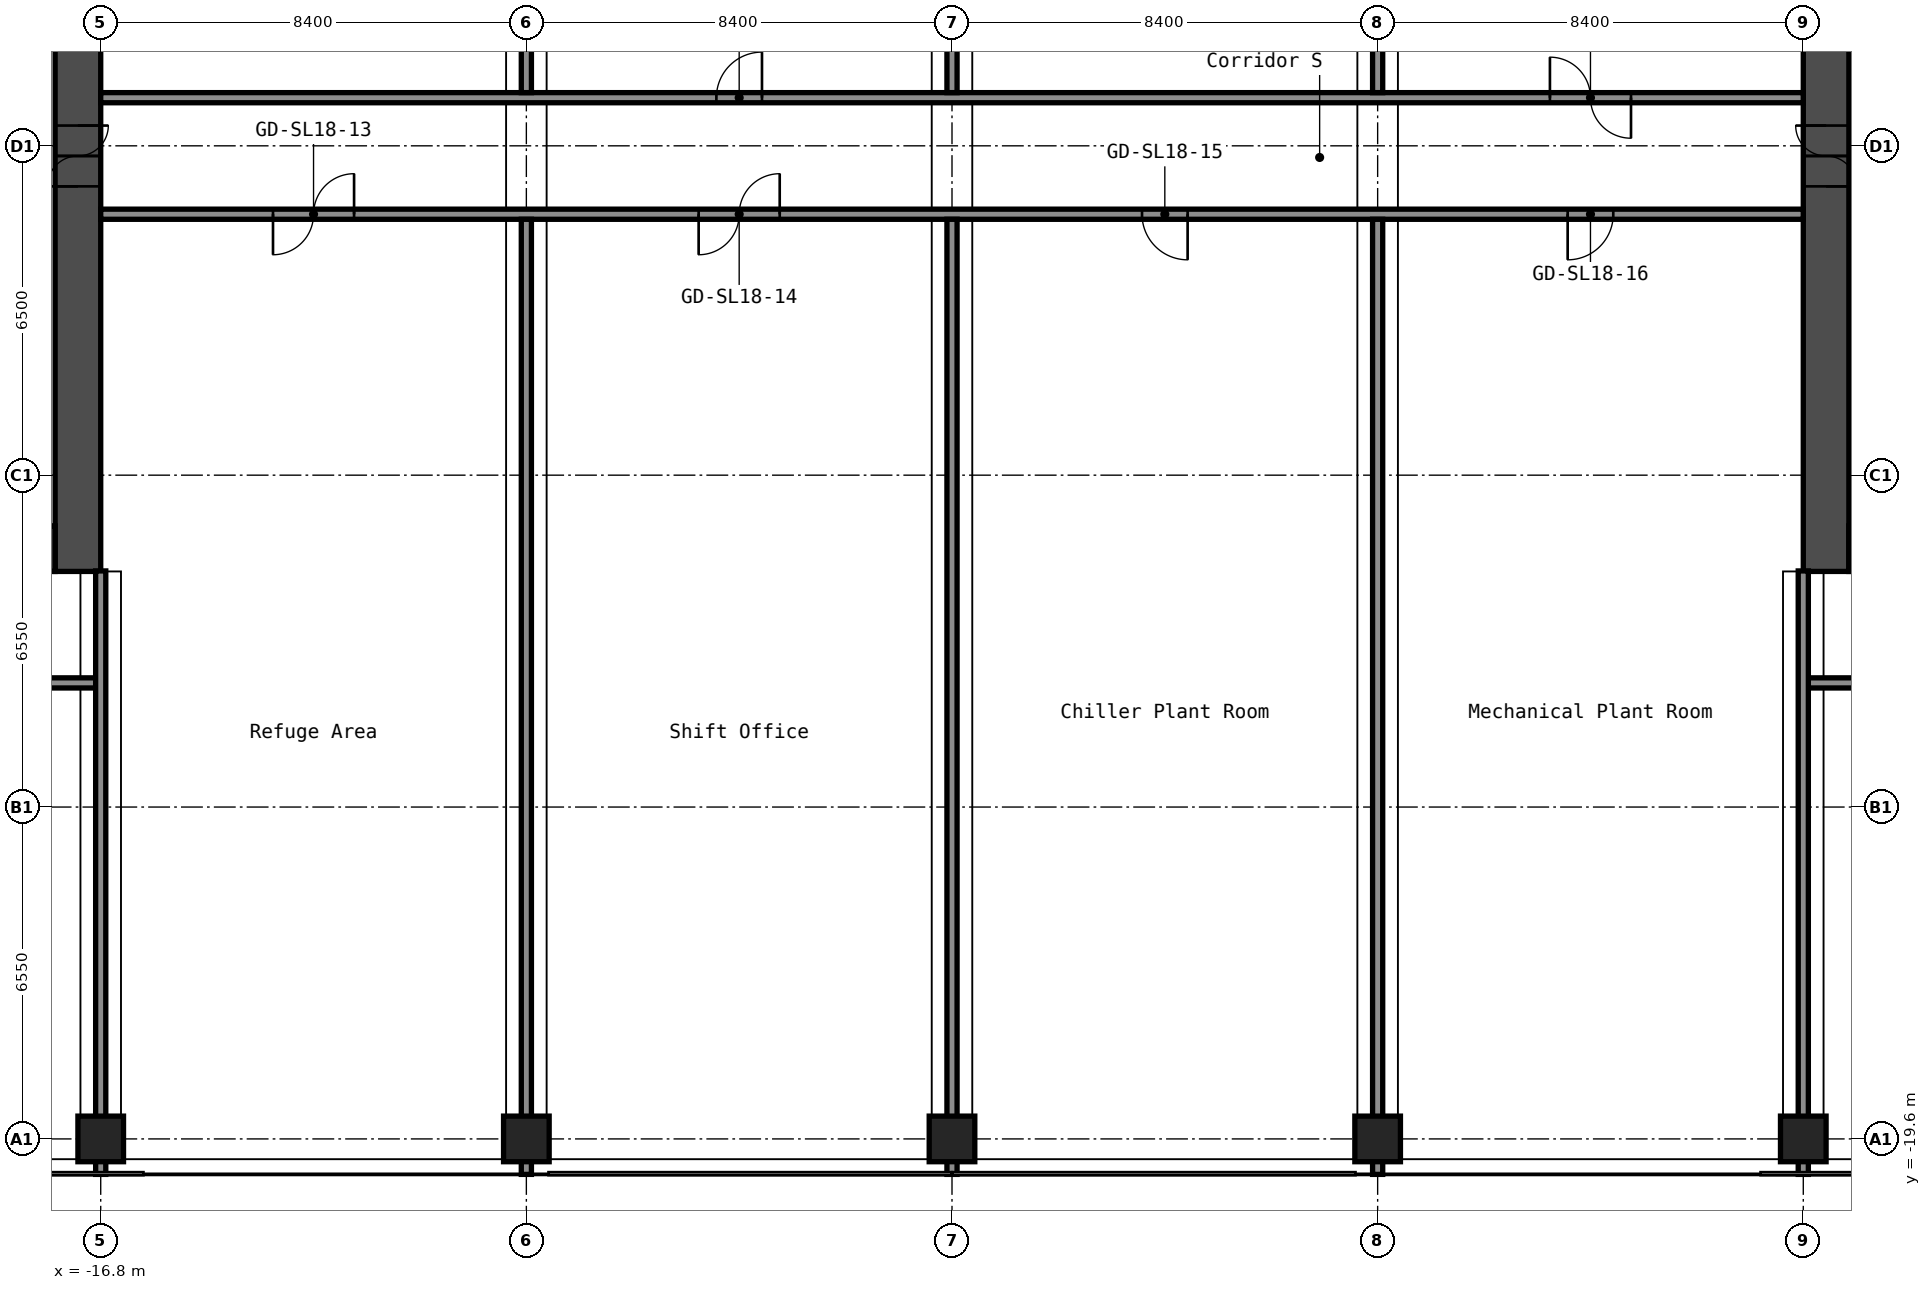
"""IFC4 building model, lengths in metres.
Left out: names, types, materials, properties, quantities, classifications, styles, units other than length and angle.
Written with IfcOpenShell. Run it as: python <this file> out.ifc"""

import sys

from ifc_helpers import new_model, si_unit, direction, frame, frame_2d, origin, origin_2d, place, context, subcontext, project, spatial, rectangle, hollow_rectangle, extrude, element, fill, save


model = new_model("IFC4")
c1 = context("Model", 3, precision=1e-05, world=origin(), true_north=direction((0.0, 1.0)))
c2 = subcontext(c1, "Body", "Model", "MODEL_VIEW")
j1 = project(units=[si_unit("LENGTHUNIT", "METRE"), si_unit("PLANEANGLEUNIT", "RADIAN")], contexts=[c1])
p1 = place(None, origin())
s1 = spatial("IfcSite", under=j1, at=p1, CompositionType="ELEMENT")
p2 = place(p1, origin())
s2 = spatial("IfcBuilding", under=s1, at=p2, CompositionType="ELEMENT")
p3 = place(p2, frame((0.0, 0.0, 64.6)))
s3 = spatial("IfcBuildingStorey", under=s2, at=p3, CompositionType="ELEMENT", Elevation=64.6)
for number, where, z_axis, x_axis in (
    (1, (-16.8, -19.6, 0.0), (0.0, 0.0, 1.0), (1.0, 0.0, 0.0)),
    (2, (-8.4, -19.6, 0.0), (0.0, 0.0, 1.0), (1.0, 0.0, 0.0)),
    (3, (0.0, -19.6, 0.0), (0.0, 0.0, 1.0), (1.0, 0.0, 0.0)),
    (4, (8.4, -19.6, 0.0), (0.0, 0.0, 1.0), (1.0, 0.0, 0.0)),
    (5, (16.8, -19.6, 0.0), (0.0, 0.0, 1.0), (1.0, 0.0, 0.0)),
):
    element("IfcColumn", number, at=place(p3, frame(where, z_axis=z_axis, x_axis=x_axis)), inside=s3, PredefinedType="COLUMN", context=c2, shape_type="SweptSolid", body=[
        extrude(hollow_rectangle(XDim=0.9, YDim=0.9, WallThickness=0.036, at=origin_2d()), origin(), (0.0, 0.0, 1.0), 4.1),
    ])
p4 = place(p3, frame((-17.25, -8.4, 0.0), z_axis=(0.0, 0.0, 1.0), x_axis=(0.0, 1.0, 0.0)))
e6 = element("IfcWall", 6, at=p4, inside=s3, PredefinedType="SHEAR", context=c2, shape_type="SweptSolid", body=[
    extrude(rectangle(XDim=16.8, YDim=0.9, at=frame_2d((8.4, 0.0))), origin(), (0.0, 0.0, 1.0), 4.1),
])
p5 = place(p4, frame((7.6, 0.0, 0.0)))
e7 = element("IfcOpeningElement", 7, at=p5, cuts=e6, PredefinedType="OPENING", context=c2, shape_type="SweptSolid", body=[
    extrude(rectangle(XDim=1.2, YDim=2.1, at=frame_2d((0.6, 1.05))), frame((0.0, 0.46, 0.0), z_axis=(0.0, -1.0, 0.0), x_axis=(1.0, 0.0, 0.0)), (0.0, 0.0, 1.0), 0.92),
])
p6 = place(p3, frame((-32.7, -7.95, 0.0), z_axis=(0.0, 0.0, 1.0), x_axis=(1.0, 0.0, 0.0)))
e8 = element("IfcWall", 8, at=p6, inside=s3, PredefinedType="SHEAR", context=c2, shape_type="SweptSolid", body=[
    extrude(rectangle(XDim=15.0, YDim=0.9, at=frame_2d((7.5, 0.0))), origin(), (0.0, 0.0, 1.0), 4.1),
])
p7 = place(p6, frame((11.45, 0.0, 0.0)))
e9 = element("IfcOpeningElement", 9, at=p7, cuts=e8, PredefinedType="OPENING", context=c2, shape_type="SweptSolid", body=[
    extrude(rectangle(XDim=1.0, YDim=2.1, at=frame_2d((0.5, 1.05))), frame((0.0, 0.46, 0.0), z_axis=(0.0, -1.0, 0.0), x_axis=(1.0, 0.0, 0.0)), (0.0, 0.0, 1.0), 0.92),
])
p8 = place(p3, frame((17.25, -8.4, 0.0), z_axis=(0.0, 0.0, 1.0), x_axis=(0.0, 1.0, 0.0)))
e10 = element("IfcWall", 10, at=p8, inside=s3, PredefinedType="SHEAR", context=c2, shape_type="SweptSolid", body=[
    extrude(rectangle(XDim=16.8, YDim=0.9, at=frame_2d((8.4, 0.0))), origin(), (0.0, 0.0, 1.0), 4.1),
])
p9 = place(p8, frame((7.6, 0.0, 0.0)))
e11 = element("IfcOpeningElement", 11, at=p9, cuts=e10, PredefinedType="OPENING", context=c2, shape_type="SweptSolid", body=[
    extrude(rectangle(XDim=1.2, YDim=2.1, at=frame_2d((0.6, 1.05))), frame((0.0, 0.46, 0.0), z_axis=(0.0, -1.0, 0.0), x_axis=(1.0, 0.0, 0.0)), (0.0, 0.0, 1.0), 0.92),
])
p10 = place(p3, frame((17.7, -7.95, 0.0), z_axis=(0.0, 0.0, 1.0), x_axis=(1.0, 0.0, 0.0)))
e12 = element("IfcWall", 12, at=p10, inside=s3, PredefinedType="SHEAR", context=c2, shape_type="SweptSolid", body=[
    extrude(rectangle(XDim=15.0, YDim=0.9, at=frame_2d((7.5, 0.0))), origin(), (0.0, 0.0, 1.0), 4.1),
])
p11 = place(p10, frame((2.55, 0.0, 0.0)))
e13 = element("IfcOpeningElement", 13, at=p11, cuts=e12, PredefinedType="OPENING", context=c2, shape_type="SweptSolid", body=[
    extrude(rectangle(XDim=1.0, YDim=2.1, at=frame_2d((0.5, 1.05))), frame((0.0, 0.46, 0.0), z_axis=(0.0, -1.0, 0.0), x_axis=(1.0, 0.0, 0.0)), (0.0, 0.0, 1.0), 0.92),
])
p12 = place(p3, frame((-51.1, -10.6, 0.0), z_axis=(0.0, 0.0, 1.0), x_axis=(1.0, 0.0, 0.0)))
e14 = element("IfcWall", 14, at=p12, inside=s3, PredefinedType="PARTITIONING", context=c2, shape_type="SweptSolid", body=[
    extrude(rectangle(XDim=34.3, YDim=0.2, at=frame_2d((17.15, 0.0))), origin(), (0.0, 0.0, 1.0), 4.1),
])
p13 = place(p12, frame((4.25, 0.0, 0.0)))
e15 = element("IfcOpeningElement", 15, at=p13, cuts=e14, PredefinedType="OPENING", context=c2, shape_type="SweptSolid", body=[
    extrude(rectangle(XDim=0.9, YDim=2.1, at=frame_2d((0.45, 1.05))), frame((0.0, 0.11, 0.0), z_axis=(0.0, -1.0, 0.0), x_axis=(1.0, 0.0, 0.0)), (0.0, 0.0, 1.0), 0.22),
])
p14 = place(p12, frame((12.85, 0.0, 0.0)))
e16 = element("IfcOpeningElement", 16, at=p14, cuts=e14, PredefinedType="OPENING", context=c2, shape_type="SweptSolid", body=[
    extrude(rectangle(XDim=0.9, YDim=2.1, at=frame_2d((0.45, 1.05))), frame((0.0, 0.11, 0.0), z_axis=(0.0, -1.0, 0.0), x_axis=(1.0, 0.0, 0.0)), (0.0, 0.0, 1.0), 0.22),
])
p15 = place(p12, frame((21.25, 0.0, 0.0)))
e17 = element("IfcOpeningElement", 17, at=p15, cuts=e14, PredefinedType="OPENING", context=c2, shape_type="SweptSolid", body=[
    extrude(rectangle(XDim=0.9, YDim=2.1, at=frame_2d((0.45, 1.05))), frame((0.0, 0.11, 0.0), z_axis=(0.0, -1.0, 0.0), x_axis=(1.0, 0.0, 0.0)), (0.0, 0.0, 1.0), 0.22),
])
p16 = place(p12, frame((29.65, 0.0, 0.0)))
e18 = element("IfcOpeningElement", 18, at=p16, cuts=e14, PredefinedType="OPENING", context=c2, shape_type="SweptSolid", body=[
    extrude(rectangle(XDim=0.9, YDim=2.1, at=frame_2d((0.45, 1.05))), frame((0.0, 0.11, 0.0), z_axis=(0.0, -1.0, 0.0), x_axis=(1.0, 0.0, 0.0)), (0.0, 0.0, 1.0), 0.22),
])
p17 = place(p3, frame((16.8, -10.6, 0.0), z_axis=(0.0, 0.0, 1.0), x_axis=(1.0, 0.0, 0.0)))
e19 = element("IfcWall", 19, at=p17, inside=s3, PredefinedType="PARTITIONING", context=c2, shape_type="SweptSolid", body=[
    extrude(rectangle(XDim=34.3, YDim=0.2, at=frame_2d((17.15, 0.0))), origin(), (0.0, 0.0, 1.0), 4.1),
])
p18 = place(p17, frame((3.4, 0.0, 0.0)))
e20 = element("IfcOpeningElement", 20, at=p18, cuts=e19, PredefinedType="OPENING", context=c2, shape_type="SweptSolid", body=[
    extrude(rectangle(XDim=1.6, YDim=2.1, at=frame_2d((0.8, 1.05))), frame((0.0, 0.11, 0.0), z_axis=(0.0, -1.0, 0.0), x_axis=(1.0, 0.0, 0.0)), (0.0, 0.0, 1.0), 0.22),
])
p19 = place(p17, frame((11.8, 0.0, 0.0)))
e21 = element("IfcOpeningElement", 21, at=p19, cuts=e19, PredefinedType="OPENING", context=c2, shape_type="SweptSolid", body=[
    extrude(rectangle(XDim=1.6, YDim=2.1, at=frame_2d((0.8, 1.05))), frame((0.0, 0.11, 0.0), z_axis=(0.0, -1.0, 0.0), x_axis=(1.0, 0.0, 0.0)), (0.0, 0.0, 1.0), 0.22),
])
p20 = place(p17, frame((20.2, 0.0, 0.0)))
e22 = element("IfcOpeningElement", 22, at=p20, cuts=e19, PredefinedType="OPENING", context=c2, shape_type="SweptSolid", body=[
    extrude(rectangle(XDim=1.6, YDim=2.1, at=frame_2d((0.8, 1.05))), frame((0.0, 0.11, 0.0), z_axis=(0.0, -1.0, 0.0), x_axis=(1.0, 0.0, 0.0)), (0.0, 0.0, 1.0), 0.22),
])
p21 = place(p17, frame((29.15, 0.0, 0.0)))
e23 = element("IfcOpeningElement", 23, at=p21, cuts=e19, PredefinedType="OPENING", context=c2, shape_type="SweptSolid", body=[
    extrude(rectangle(XDim=0.9, YDim=2.1, at=frame_2d((0.45, 1.05))), frame((0.0, 0.11, 0.0), z_axis=(0.0, -1.0, 0.0), x_axis=(1.0, 0.0, 0.0)), (0.0, 0.0, 1.0), 0.22),
])
p22 = place(p3, frame((-16.8, -1.35, 0.0), z_axis=(0.0, 0.0, 1.0), x_axis=(1.0, 0.0, 0.0)))
e24 = element("IfcWall", 24, at=p22, inside=s3, PredefinedType="PARTITIONING", context=c2, shape_type="SweptSolid", body=[
    extrude(rectangle(XDim=33.6, YDim=0.2, at=frame_2d((16.8, 0.0))), origin(), (0.0, 0.0, 1.0), 4.1),
])
p23 = place(p22, frame((3.4, 0.0, 0.0)))
e25 = element("IfcOpeningElement", 25, at=p23, cuts=e24, PredefinedType="OPENING", context=c2, shape_type="SweptSolid", body=[
    extrude(rectangle(XDim=1.6, YDim=2.1, at=frame_2d((0.8, 1.05))), frame((0.0, 0.11, 0.0), z_axis=(0.0, -1.0, 0.0), x_axis=(1.0, 0.0, 0.0)), (0.0, 0.0, 1.0), 0.22),
])
p24 = place(p22, frame((11.8, 0.0, 0.0)))
e26 = element("IfcOpeningElement", 26, at=p24, cuts=e24, PredefinedType="OPENING", context=c2, shape_type="SweptSolid", body=[
    extrude(rectangle(XDim=1.6, YDim=2.1, at=frame_2d((0.8, 1.05))), frame((0.0, 0.11, 0.0), z_axis=(0.0, -1.0, 0.0), x_axis=(1.0, 0.0, 0.0)), (0.0, 0.0, 1.0), 0.22),
])
p25 = place(p22, frame((20.55, 0.0, 0.0)))
e27 = element("IfcOpeningElement", 27, at=p25, cuts=e24, PredefinedType="OPENING", context=c2, shape_type="SweptSolid", body=[
    extrude(rectangle(XDim=0.9, YDim=2.1, at=frame_2d((0.45, 1.05))), frame((0.0, 0.11, 0.0), z_axis=(0.0, -1.0, 0.0), x_axis=(1.0, 0.0, 0.0)), (0.0, 0.0, 1.0), 0.22),
])
p26 = place(p22, frame((28.95, 0.0, 0.0)))
e28 = element("IfcOpeningElement", 28, at=p26, cuts=e24, PredefinedType="OPENING", context=c2, shape_type="SweptSolid", body=[
    extrude(rectangle(XDim=0.9, YDim=2.1, at=frame_2d((0.45, 1.05))), frame((0.0, 0.11, 0.0), z_axis=(0.0, -1.0, 0.0), x_axis=(1.0, 0.0, 0.0)), (0.0, 0.0, 1.0), 0.22),
])
p27 = place(p3, frame((-16.8, 0.95, 0.0), z_axis=(0.0, 0.0, 1.0), x_axis=(1.0, 0.0, 0.0)))
e29 = element("IfcWall", 29, at=p27, inside=s3, PredefinedType="PARTITIONING", context=c2, shape_type="SweptSolid", body=[
    extrude(rectangle(XDim=33.6, YDim=0.2, at=frame_2d((16.8, 0.0))), origin(), (0.0, 0.0, 1.0), 4.1),
])
p28 = place(p27, frame((12.15, 0.0, 0.0)))
e30 = element("IfcOpeningElement", 30, at=p28, cuts=e29, PredefinedType="OPENING", context=c2, shape_type="SweptSolid", body=[
    extrude(rectangle(XDim=0.9, YDim=2.1, at=frame_2d((0.45, 1.05))), frame((0.0, 0.11, 0.0), z_axis=(0.0, -1.0, 0.0), x_axis=(1.0, 0.0, 0.0)), (0.0, 0.0, 1.0), 0.22),
])
p29 = place(p27, frame((28.6, 0.0, 0.0)))
e31 = element("IfcOpeningElement", 31, at=p29, cuts=e29, PredefinedType="OPENING", context=c2, shape_type="SweptSolid", body=[
    extrude(rectangle(XDim=1.6, YDim=2.1, at=frame_2d((0.8, 1.05))), frame((0.0, 0.11, 0.0), z_axis=(0.0, -1.0, 0.0), x_axis=(1.0, 0.0, 0.0)), (0.0, 0.0, 1.0), 0.22),
])
p30 = place(p3, frame((-16.8, -20.3, 0.0), z_axis=(0.0, 0.0, 1.0), x_axis=(0.0, 1.0, 0.0)))
e32 = element("IfcWall", 32, at=p30, inside=s3, PredefinedType="PARTITIONING", context=c2, shape_type="SweptSolid", body=[
    extrude(rectangle(XDim=11.91, YDim=0.2, at=frame_2d((5.955, 0.0))), origin(), (0.0, 0.0, 1.0), 4.1),
])
p31 = place(p3, frame((-8.4, -20.3, 0.0), z_axis=(0.0, 0.0, 1.0), x_axis=(0.0, 1.0, 0.0)))
e33 = element("IfcWall", 33, at=p31, inside=s3, PredefinedType="PARTITIONING", context=c2, shape_type="SweptSolid", body=[
    extrude(rectangle(XDim=18.85, YDim=0.2, at=frame_2d((9.425, 0.0))), origin(), (0.0, 0.0, 1.0), 4.1),
])
p32 = place(p3, frame((-8.4, 1.05, 0.0), z_axis=(0.0, 0.0, 1.0), x_axis=(0.0, 1.0, 0.0)))
e34 = element("IfcWall", 34, at=p32, inside=s3, PredefinedType="PARTITIONING", context=c2, shape_type="SweptSolid", body=[
    extrude(rectangle(XDim=5.9, YDim=0.2, at=frame_2d((2.95, 0.0))), origin(), (0.0, 0.0, 1.0), 4.1),
])
p33 = place(p3, frame((0.0, -20.3, 0.0), z_axis=(0.0, 0.0, 1.0), x_axis=(0.0, 1.0, 0.0)))
e35 = element("IfcWall", 35, at=p33, inside=s3, PredefinedType="PARTITIONING", context=c2, shape_type="SweptSolid", body=[
    extrude(rectangle(XDim=18.85, YDim=0.2, at=frame_2d((9.425, 0.0))), origin(), (0.0, 0.0, 1.0), 4.1),
])
p34 = place(p3, frame((0.0, 1.05, 0.0), z_axis=(0.0, 0.0, 1.0), x_axis=(0.0, 1.0, 0.0)))
e36 = element("IfcWall", 36, at=p34, inside=s3, PredefinedType="PARTITIONING", context=c2, shape_type="SweptSolid", body=[
    extrude(rectangle(XDim=5.9, YDim=0.2, at=frame_2d((2.95, 0.0))), origin(), (0.0, 0.0, 1.0), 4.1),
])
p35 = place(p3, frame((8.4, -20.3, 0.0), z_axis=(0.0, 0.0, 1.0), x_axis=(0.0, 1.0, 0.0)))
e37 = element("IfcWall", 37, at=p35, inside=s3, PredefinedType="PARTITIONING", context=c2, shape_type="SweptSolid", body=[
    extrude(rectangle(XDim=18.85, YDim=0.2, at=frame_2d((9.425, 0.0))), origin(), (0.0, 0.0, 1.0), 4.1),
])
p36 = place(p3, frame((8.4, 1.05, 0.0), z_axis=(0.0, 0.0, 1.0), x_axis=(0.0, 1.0, 0.0)))
e38 = element("IfcWall", 38, at=p36, inside=s3, PredefinedType="PARTITIONING", context=c2, shape_type="SweptSolid", body=[
    extrude(rectangle(XDim=5.9, YDim=0.2, at=frame_2d((2.95, 0.0))), origin(), (0.0, 0.0, 1.0), 4.1),
])
p37 = place(p3, frame((16.8, -20.3, 0.0), z_axis=(0.0, 0.0, 1.0), x_axis=(0.0, 1.0, 0.0)))
e39 = element("IfcWall", 39, at=p37, inside=s3, PredefinedType="PARTITIONING", context=c2, shape_type="SweptSolid", body=[
    extrude(rectangle(XDim=11.91, YDim=0.2, at=frame_2d((5.955, 0.0))), origin(), (0.0, 0.0, 1.0), 4.1),
])
p38 = place(p5, origin())
e40 = element("IfcDoor", 40, at=p38, inside=s3, OperationType="DOUBLE_DOOR_SINGLE_SWING", PredefinedType="DOOR", context=c2, shape_type="SweptSolid", body=[
    extrude(rectangle(XDim=1.2, YDim=2.1, at=frame_2d((0.6, 1.05))), frame((0.0, 0.025, 0.0), z_axis=(0.0, -1.0, 0.0), x_axis=(1.0, 0.0, 0.0)), (0.0, 0.0, 1.0), 0.05),
])
fill(e7, e40)
p39 = place(p9, origin())
e41 = element("IfcDoor", 41, at=p39, inside=s3, OperationType="DOUBLE_DOOR_SINGLE_SWING", PredefinedType="DOOR", context=c2, shape_type="SweptSolid", body=[
    extrude(rectangle(XDim=1.2, YDim=2.1, at=frame_2d((0.6, 1.05))), frame((0.0, 0.025, 0.0), z_axis=(0.0, -1.0, 0.0), x_axis=(1.0, 0.0, 0.0)), (0.0, 0.0, 1.0), 0.05),
])
fill(e11, e41)
p40 = place(p23, origin())
e42 = element("IfcDoor", 42, at=p40, inside=s3, OperationType="DOUBLE_DOOR_SINGLE_SWING", PredefinedType="DOOR", context=c2, shape_type="SweptSolid", body=[
    extrude(rectangle(XDim=1.6, YDim=2.1, at=frame_2d((0.8, 1.05))), frame((0.0, 0.025, 0.0), z_axis=(0.0, -1.0, 0.0), x_axis=(1.0, 0.0, 0.0)), (0.0, 0.0, 1.0), 0.05),
])
fill(e25, e42)
p41 = place(p24, origin())
e43 = element("IfcDoor", 43, at=p41, inside=s3, OperationType="DOUBLE_DOOR_SINGLE_SWING", PredefinedType="DOOR", context=c2, shape_type="SweptSolid", body=[
    extrude(rectangle(XDim=1.6, YDim=2.1, at=frame_2d((0.8, 1.05))), frame((0.0, 0.025, 0.0), z_axis=(0.0, -1.0, 0.0), x_axis=(1.0, 0.0, 0.0)), (0.0, 0.0, 1.0), 0.05),
])
fill(e26, e43)
p42 = place(p25, origin())
e44 = element("IfcDoor", 44, at=p42, inside=s3, OperationType="SINGLE_SWING_RIGHT", PredefinedType="DOOR", context=c2, shape_type="SweptSolid", body=[
    extrude(rectangle(XDim=0.9, YDim=2.1, at=frame_2d((0.45, 1.05))), frame((0.0, 0.025, 0.0), z_axis=(0.0, -1.0, 0.0), x_axis=(1.0, 0.0, 0.0)), (0.0, 0.0, 1.0), 0.05),
])
fill(e27, e44)
p43 = place(p26, origin())
e45 = element("IfcDoor", 45, at=p43, inside=s3, OperationType="SINGLE_SWING_LEFT", PredefinedType="DOOR", context=c2, shape_type="SweptSolid", body=[
    extrude(rectangle(XDim=0.9, YDim=2.1, at=frame_2d((0.45, 1.05))), frame((0.0, 0.025, 0.0), z_axis=(0.0, -1.0, 0.0), x_axis=(1.0, 0.0, 0.0)), (0.0, 0.0, 1.0), 0.05),
])
fill(e28, e45)
p44 = place(p28, origin())
e46 = element("IfcDoor", 46, at=p44, inside=s3, OperationType="SINGLE_SWING_LEFT", PredefinedType="DOOR", context=c2, shape_type="SweptSolid", body=[
    extrude(rectangle(XDim=0.9, YDim=2.1, at=frame_2d((0.45, 1.05))), frame((0.0, 0.025, 0.0), z_axis=(0.0, -1.0, 0.0), x_axis=(1.0, 0.0, 0.0)), (0.0, 0.0, 1.0), 0.05),
])
fill(e30, e46)
p45 = place(p29, origin())
e47 = element("IfcDoor", 47, at=p45, inside=s3, OperationType="DOUBLE_DOOR_SINGLE_SWING", PredefinedType="DOOR", context=c2, shape_type="SweptSolid", body=[
    extrude(rectangle(XDim=1.6, YDim=2.1, at=frame_2d((0.8, 1.05))), frame((0.0, 0.025, 0.0), z_axis=(0.0, -1.0, 0.0), x_axis=(1.0, 0.0, 0.0)), (0.0, 0.0, 1.0), 0.05),
])
fill(e31, e47)
save(model, sys.argv[1])
